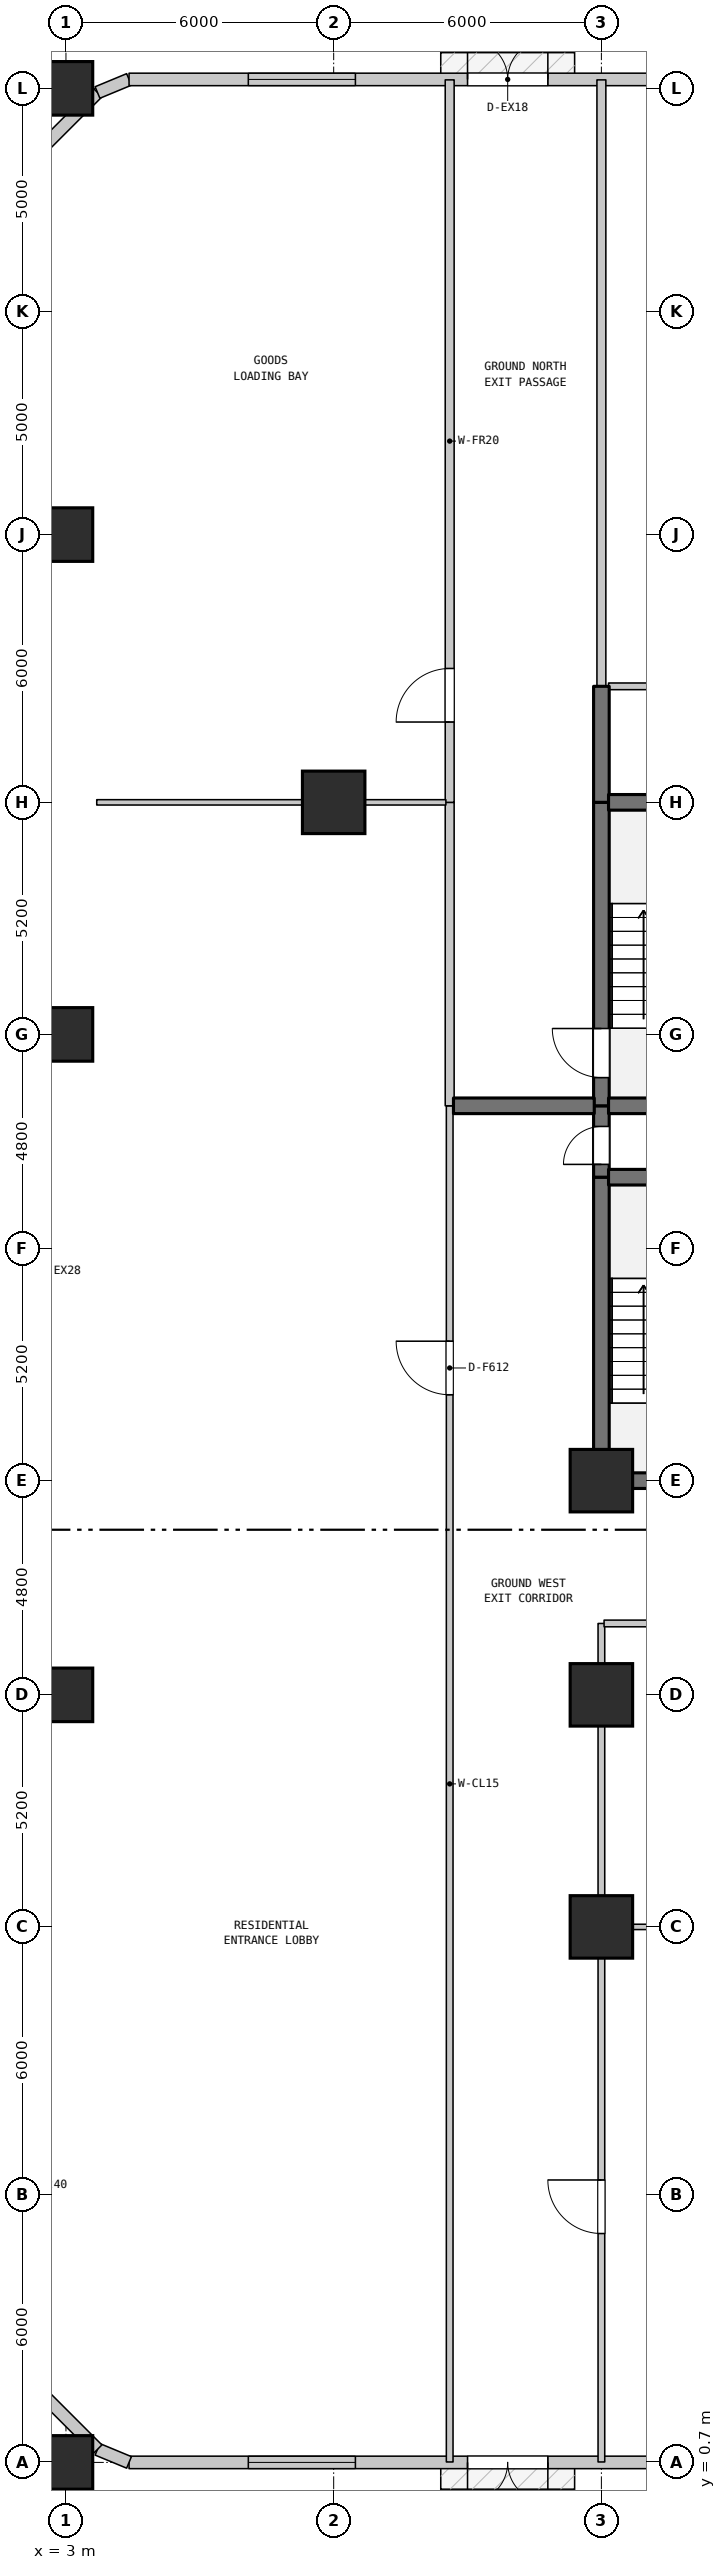
"""IFC4 building model, lengths in metres.
Left out: names, types, materials, properties, quantities, classifications, styles, units other than length and angle.
Written with IfcOpenShell. Run it as: python <this file> out.ifc"""

import sys

from ifc_helpers import new_model, si_unit, direction, frame, frame_2d, origin, origin_2d, place, context, subcontext, project, spatial, rectangle, extrude, element, fill, save


model = new_model("IFC4")
c1 = context("Model", 3, precision=1e-05, world=origin(), true_north=direction((0.0, 1.0)))
c2 = subcontext(c1, "Body", "Model", "MODEL_VIEW")
j1 = project(units=[si_unit("LENGTHUNIT", "METRE"), si_unit("PLANEANGLEUNIT", "RADIAN")], contexts=[c1])
p1 = place(None, origin())
s1 = spatial("IfcSite", under=j1, at=p1, CompositionType="ELEMENT")
p2 = place(p1, origin())
s2 = spatial("IfcBuilding", under=s1, at=p2, CompositionType="ELEMENT")
p3 = place(p2, origin())
s3 = spatial("IfcBuildingStorey", under=s2, at=p3, CompositionType="ELEMENT", Elevation=0.0)
for number, where, z_axis, x_axis in (
    (1, (3.0, 0.7, 0.0), (0.0, 0.0, 1.0), (1.0, 0.0, 0.0)),
    (2, (3.0, 17.9, 0.0), (0.0, 0.0, 1.0), (1.0, 0.0, 0.0)),
    (3, (3.0, 32.7, 0.0), (0.0, 0.0, 1.0), (1.0, 0.0, 0.0)),
    (4, (3.0, 43.9, 0.0), (0.0, 0.0, 1.0), (1.0, 0.0, 0.0)),
    (5, (3.0, 53.9, 0.0), (0.0, 0.0, 1.0), (1.0, 0.0, 0.0)),
):
    element("IfcColumn", number, at=place(p3, frame(where, z_axis=z_axis, x_axis=x_axis)), inside=s3, PredefinedType="PILASTER", context=c2, shape_type="SweptSolid", body=[
        extrude(rectangle(XDim=1.2, YDim=1.2, at=origin_2d()), origin(), (0.0, 0.0, 1.0), 6.5),
    ])
for number, where, z_axis, x_axis in (
    (6, (9.0, 37.9, 0.0), (0.0, 0.0, 1.0), (1.0, 0.0, 0.0)),
    (7, (15.0, 12.7, 0.0), (0.0, 0.0, 1.0), (1.0, 0.0, 0.0)),
    (8, (15.0, 17.9, 0.0), (0.0, 0.0, 1.0), (1.0, 0.0, 0.0)),
    (9, (15.0, 22.7, 0.0), (0.0, 0.0, 1.0), (1.0, 0.0, 0.0)),
):
    element("IfcColumn", number, at=place(p3, frame(where, z_axis=z_axis, x_axis=x_axis)), inside=s3, PredefinedType="COLUMN", context=c2, shape_type="SweptSolid", body=[
        extrude(rectangle(XDim=1.4, YDim=1.4, at=origin_2d()), origin(), (0.0, 0.0, 1.0), 6.5),
    ])
p4 = place(p3, frame((2.293, 52.393, 0.0), z_axis=(0.0, 0.0, 1.0), x_axis=(0.707167825498, 0.707045731605, 0.0)))
e10 = element("IfcWall", 10, at=p4, inside=s3, PredefinedType="STANDARD", context=c2, shape_type="SweptSolid", body=[
    extrude(rectangle(XDim=2.0, YDim=0.28, at=frame_2d((1.0, 0.0))), origin(), (0.0, 0.0, 1.0), 6.17),
])
p5 = place(p3, frame((3.707, 53.807, 0.0), z_axis=(0.0, 0.0, 1.0), x_axis=(0.923717339373, 0.383074766777, 0.0)))
e11 = element("IfcWall", 11, at=p5, inside=s3, PredefinedType="STANDARD", context=c2, shape_type="SweptSolid", body=[
    extrude(rectangle(XDim=0.765, YDim=0.28, at=frame_2d((0.383, 0.0))), origin(), (0.0, 0.0, 1.0), 6.17),
])
p6 = place(p3, frame((4.414, 54.1, 0.0), z_axis=(0.0, 0.0, 1.0), x_axis=(1.0, 0.0, 0.0)))
e12 = element("IfcWall", 12, at=p6, inside=s3, PredefinedType="STANDARD", context=c2, shape_type="SweptSolid", body=[
    extrude(rectangle(XDim=28.586, YDim=0.28, at=frame_2d((14.293, 0.0))), origin(), (0.0, 0.0, 1.0), 6.17),
])
p7 = place(p6, frame((7.586, 0.0, 0.0)))
e13 = element("IfcOpeningElement", 13, at=p7, cuts=e12, PredefinedType="OPENING", context=c2, shape_type="SweptSolid", body=[
    extrude(rectangle(XDim=1.8, YDim=2.4, at=frame_2d((0.9, 1.2))), frame((0.0, 0.15, 0.0), z_axis=(0.0, -1.0, 0.0), x_axis=(1.0, 0.0, 0.0)), (0.0, 0.0, 1.0), 0.3),
])
p8 = place(p6, frame((2.673, 0.0, 0.9)))
e14 = element("IfcOpeningElement", 14, at=p8, cuts=e12, PredefinedType="OPENING", context=c2, shape_type="SweptSolid", body=[
    extrude(rectangle(XDim=2.4, YDim=2.4, at=frame_2d((1.2, 1.2))), frame((0.0, 0.15, 0.0), z_axis=(0.0, -1.0, 0.0), x_axis=(1.0, 0.0, 0.0)), (0.0, 0.0, 1.0), 0.3),
])
p9 = place(p6, frame((17.816, 0.0, 0.9)))
e15 = element("IfcOpeningElement", 15, at=p9, cuts=e12, PredefinedType="OPENING", context=c2, shape_type="SweptSolid", body=[
    extrude(rectangle(XDim=2.4, YDim=2.4, at=frame_2d((1.2, 1.2))), frame((0.0, 0.15, 0.0), z_axis=(0.0, -1.0, 0.0), x_axis=(1.0, 0.0, 0.0)), (0.0, 0.0, 1.0), 0.3),
])
p10 = place(p6, frame((23.963, 0.0, 0.9)))
e16 = element("IfcOpeningElement", 16, at=p10, cuts=e12, PredefinedType="OPENING", context=c2, shape_type="SweptSolid", body=[
    extrude(rectangle(XDim=2.4, YDim=2.4, at=frame_2d((1.2, 1.2))), frame((0.0, 0.15, 0.0), z_axis=(0.0, -1.0, 0.0), x_axis=(1.0, 0.0, 0.0)), (0.0, 0.0, 1.0), 0.3),
])
p11 = place(p3, frame((33.0, 0.7, 0.0), z_axis=(0.0, 0.0, 1.0), x_axis=(-1.0, 0.0, 0.0)))
e17 = element("IfcWall", 17, at=p11, inside=s3, PredefinedType="STANDARD", context=c2, shape_type="SweptSolid", body=[
    extrude(rectangle(XDim=28.586, YDim=0.28, at=frame_2d((14.293, 0.0))), origin(), (0.0, 0.0, 1.0), 6.17),
])
p12 = place(p11, frame((19.2, 0.0, 0.0)))
e18 = element("IfcOpeningElement", 18, at=p12, cuts=e17, PredefinedType="OPENING", context=c2, shape_type="SweptSolid", body=[
    extrude(rectangle(XDim=1.8, YDim=2.4, at=frame_2d((0.9, 1.2))), frame((0.0, 0.15, 0.0), z_axis=(0.0, -1.0, 0.0), x_axis=(1.0, 0.0, 0.0)), (0.0, 0.0, 1.0), 0.3),
])
p13 = place(p11, frame((14.293, 0.0, 0.0)))
e19 = element("IfcOpeningElement", 19, at=p13, cuts=e17, PredefinedType="OPENING", context=c2, shape_type="SweptSolid", body=[
    extrude(rectangle(XDim=2.4, YDim=2.45, at=frame_2d((1.2, 1.225))), frame((0.0, 0.15, 0.0), z_axis=(0.0, -1.0, 0.0), x_axis=(1.0, 0.0, 0.0)), (0.0, 0.0, 1.0), 0.3),
])
p14 = place(p11, frame((2.223, 0.0, 0.9)))
e20 = element("IfcOpeningElement", 20, at=p14, cuts=e17, PredefinedType="OPENING", context=c2, shape_type="SweptSolid", body=[
    extrude(rectangle(XDim=2.4, YDim=2.4, at=frame_2d((1.2, 1.2))), frame((0.0, 0.15, 0.0), z_axis=(0.0, -1.0, 0.0), x_axis=(1.0, 0.0, 0.0)), (0.0, 0.0, 1.0), 0.3),
])
p15 = place(p11, frame((8.37, 0.0, 0.9)))
e21 = element("IfcOpeningElement", 21, at=p15, cuts=e17, PredefinedType="OPENING", context=c2, shape_type="SweptSolid", body=[
    extrude(rectangle(XDim=2.4, YDim=2.4, at=frame_2d((1.2, 1.2))), frame((0.0, 0.15, 0.0), z_axis=(0.0, -1.0, 0.0), x_axis=(1.0, 0.0, 0.0)), (0.0, 0.0, 1.0), 0.3),
])
p16 = place(p11, frame((23.513, 0.0, 0.9)))
e22 = element("IfcOpeningElement", 22, at=p16, cuts=e17, PredefinedType="OPENING", context=c2, shape_type="SweptSolid", body=[
    extrude(rectangle(XDim=2.4, YDim=2.4, at=frame_2d((1.2, 1.2))), frame((0.0, 0.15, 0.0), z_axis=(0.0, -1.0, 0.0), x_axis=(1.0, 0.0, 0.0)), (0.0, 0.0, 1.0), 0.3),
])
p17 = place(p3, frame((4.414, 0.7, 0.0), z_axis=(0.0, 0.0, 1.0), x_axis=(-0.92383017907, 0.382802560388, 0.0)))
e23 = element("IfcWall", 23, at=p17, inside=s3, PredefinedType="STANDARD", context=c2, shape_type="SweptSolid", body=[
    extrude(rectangle(XDim=0.765, YDim=0.28, at=frame_2d((0.383, 0.0))), origin(), (0.0, 0.0, 1.0), 6.17),
])
p18 = place(p3, frame((3.707, 0.993, 0.0), z_axis=(0.0, 0.0, 1.0), x_axis=(-0.707106781187, 0.707106781187, 0.0)))
e24 = element("IfcWall", 24, at=p18, inside=s3, PredefinedType="STANDARD", context=c2, shape_type="SweptSolid", body=[
    extrude(rectangle(XDim=2.0, YDim=0.28, at=frame_2d((1.0, 0.0))), origin(), (0.0, 0.0, 1.0), 6.17),
])
p19 = place(p3, frame((11.6, 0.71, 0.0), z_axis=(0.0, 0.0, 1.0), x_axis=(0.0, 1.0, 0.0)))
e25 = element("IfcWall", 25, at=p19, inside=s3, PredefinedType="STANDARD", context=c2, shape_type="SweptSolid", body=[
    extrude(rectangle(XDim=30.39, YDim=0.15, at=frame_2d((15.195, 0.0))), origin(), (0.0, 0.0, 1.0), 6.17),
])
p20 = place(p19, frame((23.915, 0.0, 0.0)))
e26 = element("IfcOpeningElement", 26, at=p20, cuts=e25, PredefinedType="OPENING", context=c2, shape_type="SweptSolid", body=[
    extrude(rectangle(XDim=1.2, YDim=2.2, at=frame_2d((0.6, 1.1))), frame((0.0, 0.085, 0.0), z_axis=(0.0, -1.0, 0.0), x_axis=(1.0, 0.0, 0.0)), (0.0, 0.0, 1.0), 0.17),
])
p21 = place(p3, frame((11.6, 31.1, 0.0), z_axis=(0.0, 0.0, 1.0), x_axis=(0.0, 1.0, 0.0)))
e27 = element("IfcWall", 27, at=p21, inside=s3, PredefinedType="STANDARD", context=c2, shape_type="SweptSolid", body=[
    extrude(rectangle(XDim=6.8, YDim=0.2, at=frame_2d((3.4, 0.0))), origin(), (0.0, 0.0, 1.0), 6.17),
])
p22 = place(p3, frame((11.6, 37.9, 0.0), z_axis=(0.0, 0.0, 1.0), x_axis=(0.0, 1.0, 0.0)))
e28 = element("IfcWall", 28, at=p22, inside=s3, PredefinedType="STANDARD", context=c2, shape_type="SweptSolid", body=[
    extrude(rectangle(XDim=16.19, YDim=0.2, at=frame_2d((8.095, 0.0))), origin(), (0.0, 0.0, 1.0), 6.17),
])
p23 = place(p22, frame((1.8, 0.0, 0.0)))
e29 = element("IfcOpeningElement", 29, at=p23, cuts=e28, PredefinedType="OPENING", context=c2, shape_type="SweptSolid", body=[
    extrude(rectangle(XDim=1.2, YDim=2.2, at=frame_2d((0.6, 1.1))), frame((0.0, 0.11, 0.0), z_axis=(0.0, -1.0, 0.0), x_axis=(1.0, 0.0, 0.0)), (0.0, 0.0, 1.0), 0.22),
])
p24 = place(p3, frame((15.0, 0.71, 0.0), z_axis=(0.0, 0.0, 1.0), x_axis=(0.0, 1.0, 0.0)))
e30 = element("IfcWall", 30, at=p24, inside=s3, PredefinedType="STANDARD", context=c2, shape_type="SweptSolid", body=[
    extrude(rectangle(XDim=11.99, YDim=0.15, at=frame_2d((5.995, 0.0))), origin(), (0.0, 0.0, 1.0), 6.17),
])
p25 = place(p24, frame((5.119, 0.0, 0.0)))
e31 = element("IfcOpeningElement", 31, at=p25, cuts=e30, PredefinedType="OPENING", context=c2, shape_type="SweptSolid", body=[
    extrude(rectangle(XDim=1.2, YDim=2.2, at=frame_2d((0.6, 1.1))), frame((0.0, 0.085, 0.0), z_axis=(0.0, -1.0, 0.0), x_axis=(1.0, 0.0, 0.0)), (0.0, 0.0, 1.0), 0.17),
])
p26 = place(p3, frame((15.0, 12.7, 0.0), z_axis=(0.0, 0.0, 1.0), x_axis=(0.0, 1.0, 0.0)))
e32 = element("IfcWall", 32, at=p26, inside=s3, PredefinedType="STANDARD", context=c2, shape_type="SweptSolid", body=[
    extrude(rectangle(XDim=6.8, YDim=0.15, at=frame_2d((3.4, 0.0))), origin(), (0.0, 0.0, 1.0), 5.67),
])
p27 = place(p3, frame((15.0, 22.7, 0.0), z_axis=(0.0, 0.0, 1.0), x_axis=(0.0, 1.0, 0.0)))
e33 = element("IfcWall", 33, at=p27, inside=s3, PredefinedType="SHEAR", context=c2, shape_type="SweptSolid", body=[
    extrude(rectangle(XDim=6.8, YDim=0.35, at=frame_2d((3.4, 0.0))), origin(), (0.0, 0.0, 1.0), 6.17),
])
p28 = place(p3, frame((15.0, 29.5, 0.0), z_axis=(0.0, 0.0, 1.0), x_axis=(0.0, 1.0, 0.0)))
e34 = element("IfcWall", 34, at=p28, inside=s3, PredefinedType="SHEAR", context=c2, shape_type="SweptSolid", body=[
    extrude(rectangle(XDim=1.6, YDim=0.35, at=frame_2d((0.8, 0.0))), origin(), (0.0, 0.0, 1.0), 6.17),
])
p29 = place(p28, frame((0.287, 0.0, 0.0)))
e35 = element("IfcOpeningElement", 35, at=p29, cuts=e34, PredefinedType="OPENING", context=c2, shape_type="SweptSolid", body=[
    extrude(rectangle(XDim=0.85, YDim=2.1, at=frame_2d((0.425, 1.05))), frame((0.0, 0.185, 0.0), z_axis=(0.0, -1.0, 0.0), x_axis=(1.0, 0.0, 0.0)), (0.0, 0.0, 1.0), 0.37),
])
p30 = place(p3, frame((15.0, 31.1, 0.0), z_axis=(0.0, 0.0, 1.0), x_axis=(0.0, 1.0, 0.0)))
e36 = element("IfcWall", 36, at=p30, inside=s3, PredefinedType="SHEAR", context=c2, shape_type="SweptSolid", body=[
    extrude(rectangle(XDim=6.8, YDim=0.35, at=frame_2d((3.4, 0.0))), origin(), (0.0, 0.0, 1.0), 6.17),
])
p31 = place(p30, frame((0.632, 0.0, 0.0)))
e37 = element("IfcOpeningElement", 37, at=p31, cuts=e36, PredefinedType="OPENING", context=c2, shape_type="SweptSolid", body=[
    extrude(rectangle(XDim=1.1, YDim=2.15, at=frame_2d((0.55, 1.075))), frame((0.0, 0.185, 0.0), z_axis=(0.0, -1.0, 0.0), x_axis=(1.0, 0.0, 0.0)), (0.0, 0.0, 1.0), 0.37),
])
p32 = place(p3, frame((15.0, 37.9, 0.0), z_axis=(0.0, 0.0, 1.0), x_axis=(0.0, 1.0, 0.0)))
e38 = element("IfcWall", 38, at=p32, inside=s3, PredefinedType="SHEAR", context=c2, shape_type="SweptSolid", body=[
    extrude(rectangle(XDim=2.6, YDim=0.35, at=frame_2d((1.3, 0.0))), origin(), (0.0, 0.0, 1.0), 6.17),
])
p33 = place(p3, frame((15.0, 40.5, 0.0), z_axis=(0.0, 0.0, 1.0), x_axis=(0.0, 1.0, 0.0)))
e39 = element("IfcWall", 39, at=p33, inside=s3, PredefinedType="STANDARD", context=c2, shape_type="SweptSolid", body=[
    extrude(rectangle(XDim=13.59, YDim=0.2, at=frame_2d((6.795, 0.0))), origin(), (0.0, 0.0, 1.0), 6.17),
])
p34 = place(p3, frame((15.06, 12.7, 0.0), z_axis=(0.0, 0.0, 1.0), x_axis=(1.0, 0.0, 0.0)))
e40 = element("IfcWall", 40, at=p34, inside=s3, PredefinedType="PARTITIONING", context=c2, shape_type="SweptSolid", body=[
    extrude(rectangle(XDim=8.895, YDim=0.12, at=frame_2d((4.448, 0.0))), origin(), (0.0, 0.0, 1.0), 6.17),
])
p35 = place(p3, frame((15.06, 19.5, 0.0), z_axis=(0.0, 0.0, 1.0), x_axis=(1.0, 0.0, 0.0)))
e41 = element("IfcWall", 41, at=p35, inside=s3, PredefinedType="STANDARD", context=c2, shape_type="SweptSolid", body=[
    extrude(rectangle(XDim=8.895, YDim=0.15, at=frame_2d((4.448, 0.0))), origin(), (0.0, 0.0, 1.0), 6.17),
])
p36 = place(p35, frame((3.89, 0.0, 0.0)))
e42 = element("IfcOpeningElement", 42, at=p36, cuts=e41, PredefinedType="OPENING", context=c2, shape_type="SweptSolid", body=[
    extrude(rectangle(XDim=1.1, YDim=2.15, at=frame_2d((0.55, 1.075))), frame((0.0, 0.085, 0.0), z_axis=(0.0, -1.0, 0.0), x_axis=(1.0, 0.0, 0.0)), (0.0, 0.0, 1.0), 0.17),
])
p37 = place(p3, frame((15.16, 22.7, 0.0), z_axis=(0.0, 0.0, 1.0), x_axis=(1.0, 0.0, 0.0)))
e43 = element("IfcWall", 43, at=p37, inside=s3, PredefinedType="SHEAR", context=c2, shape_type="SweptSolid", body=[
    extrude(rectangle(XDim=3.68, YDim=0.35, at=frame_2d((1.84, 0.0))), origin(), (0.0, 0.0, 1.0), 6.17),
])
p38 = place(p37, frame((1.217, 0.0, 0.0)))
e44 = element("IfcOpeningElement", 44, at=p38, cuts=e43, PredefinedType="OPENING", context=c2, shape_type="SweptSolid", body=[
    extrude(rectangle(XDim=1.1, YDim=2.15, at=frame_2d((0.55, 1.075))), frame((0.0, 0.185, 0.0), z_axis=(0.0, -1.0, 0.0), x_axis=(1.0, 0.0, 0.0)), (0.0, 0.0, 1.0), 0.37),
])
p39 = place(p3, frame((15.16, 29.5, 0.0), z_axis=(0.0, 0.0, 1.0), x_axis=(1.0, 0.0, 0.0)))
e45 = element("IfcWall", 45, at=p39, inside=s3, PredefinedType="SHEAR", context=c2, shape_type="SweptSolid", body=[
    extrude(rectangle(XDim=3.68, YDim=0.35, at=frame_2d((1.84, 0.0))), origin(), (0.0, 0.0, 1.0), 6.17),
])
p40 = place(p3, frame((11.685, 31.1, 0.0), z_axis=(0.0, 0.0, 1.0), x_axis=(1.0, 0.0, 0.0)))
e46 = element("IfcWall", 46, at=p40, inside=s3, PredefinedType="SHEAR", context=c2, shape_type="SweptSolid", body=[
    extrude(rectangle(XDim=3.155, YDim=0.35, at=frame_2d((1.578, 0.0))), origin(), (0.0, 0.0, 1.0), 6.17),
])
p41 = place(p3, frame((15.16, 31.1, 0.0), z_axis=(0.0, 0.0, 1.0), x_axis=(1.0, 0.0, 0.0)))
e47 = element("IfcWall", 47, at=p41, inside=s3, PredefinedType="SHEAR", context=c2, shape_type="SweptSolid", body=[
    extrude(rectangle(XDim=3.68, YDim=0.35, at=frame_2d((1.84, 0.0))), origin(), (0.0, 0.0, 1.0), 6.17),
])
p42 = place(p3, frame((3.69, 37.9, 0.0), z_axis=(0.0, 0.0, 1.0), x_axis=(1.0, 0.0, 0.0)))
e48 = element("IfcWall", 48, at=p42, inside=s3, PredefinedType="PARTITIONING", context=c2, shape_type="SweptSolid", body=[
    extrude(rectangle(XDim=7.825, YDim=0.12, at=frame_2d((3.913, 0.0))), origin(), (0.0, 0.0, 1.0), 6.17),
])
p43 = place(p3, frame((15.16, 37.9, 0.0), z_axis=(0.0, 0.0, 1.0), x_axis=(1.0, 0.0, 0.0)))
e49 = element("IfcWall", 49, at=p43, inside=s3, PredefinedType="SHEAR", context=c2, shape_type="SweptSolid", body=[
    extrude(rectangle(XDim=3.68, YDim=0.35, at=frame_2d((1.84, 0.0))), origin(), (0.0, 0.0, 1.0), 6.17),
])
p44 = place(p3, frame((15.16, 40.5, 0.0), z_axis=(0.0, 0.0, 1.0), x_axis=(1.0, 0.0, 0.0)))
e50 = element("IfcWall", 50, at=p44, inside=s3, PredefinedType="STANDARD", context=c2, shape_type="SweptSolid", body=[
    extrude(rectangle(XDim=17.83, YDim=0.15, at=frame_2d((8.915, 0.0))), origin(), (0.0, 0.0, 1.0), 6.17),
])
p45 = place(p44, frame((5.24, 0.0, 0.0)))
e51 = element("IfcOpeningElement", 51, at=p45, cuts=e50, PredefinedType="OPENING", context=c2, shape_type="SweptSolid", body=[
    extrude(rectangle(XDim=1.2, YDim=2.2, at=frame_2d((0.6, 1.1))), frame((0.0, 0.085, 0.0), z_axis=(0.0, -1.0, 0.0), x_axis=(1.0, 0.0, 0.0)), (0.0, 0.0, 1.0), 0.17),
])
p46 = place(p7, origin())
e52 = element("IfcDoor", 52, at=p46, inside=s3, OperationType="DOUBLE_DOOR_SINGLE_SWING", PredefinedType="DOOR", context=c2, shape_type="SweptSolid", body=[
    extrude(rectangle(XDim=1.8, YDim=2.4, at=frame_2d((0.9, 1.2))), frame((0.0, 0.025, 0.0), z_axis=(0.0, -1.0, 0.0), x_axis=(1.0, 0.0, 0.0)), (0.0, 0.0, 1.0), 0.05),
])
fill(e13, e52)
p47 = place(p8, origin())
e53 = element("IfcWindow", 53, at=p47, inside=s3, PartitioningType="DOUBLE_PANEL_VERTICAL", PredefinedType="WINDOW", context=c2, shape_type="SweptSolid", body=[
    extrude(rectangle(XDim=2.4, YDim=2.4, at=frame_2d((1.2, 1.2))), frame((0.0, 0.03, 0.0), z_axis=(0.0, -1.0, 0.0), x_axis=(1.0, 0.0, 0.0)), (0.0, 0.0, 1.0), 0.06),
])
fill(e14, e53)
p48 = place(p12, origin())
e54 = element("IfcDoor", 54, at=p48, inside=s3, OperationType="DOUBLE_DOOR_SINGLE_SWING", PredefinedType="DOOR", context=c2, shape_type="SweptSolid", body=[
    extrude(rectangle(XDim=1.8, YDim=2.4, at=frame_2d((0.9, 1.2))), frame((0.0, 0.025, 0.0), z_axis=(0.0, -1.0, 0.0), x_axis=(1.0, 0.0, 0.0)), (0.0, 0.0, 1.0), 0.05),
])
fill(e18, e54)
p49 = place(p16, origin())
e55 = element("IfcWindow", 55, at=p49, inside=s3, PartitioningType="DOUBLE_PANEL_VERTICAL", PredefinedType="WINDOW", context=c2, shape_type="SweptSolid", body=[
    extrude(rectangle(XDim=2.4, YDim=2.4, at=frame_2d((1.2, 1.2))), frame((0.0, 0.03, 0.0), z_axis=(0.0, -1.0, 0.0), x_axis=(1.0, 0.0, 0.0)), (0.0, 0.0, 1.0), 0.06),
])
fill(e22, e55)
p50 = place(p20, origin())
e56 = element("IfcDoor", 56, at=p50, inside=s3, OperationType="SINGLE_SWING_RIGHT", PredefinedType="DOOR", context=c2, shape_type="SweptSolid", body=[
    extrude(rectangle(XDim=1.2, YDim=2.2, at=frame_2d((0.6, 1.1))), frame((0.0, 0.025, 0.0), z_axis=(0.0, -1.0, 0.0), x_axis=(1.0, 0.0, 0.0)), (0.0, 0.0, 1.0), 0.05),
])
fill(e26, e56)
p51 = place(p23, origin())
e57 = element("IfcDoor", 57, at=p51, inside=s3, OperationType="SINGLE_SWING_LEFT", PredefinedType="DOOR", context=c2, shape_type="SweptSolid", body=[
    extrude(rectangle(XDim=1.2, YDim=2.2, at=frame_2d((0.6, 1.1))), frame((0.0, 0.025, 0.0), z_axis=(0.0, -1.0, 0.0), x_axis=(1.0, 0.0, 0.0)), (0.0, 0.0, 1.0), 0.05),
])
fill(e29, e57)
p52 = place(p25, origin())
e58 = element("IfcDoor", 58, at=p52, inside=s3, OperationType="SINGLE_SWING_RIGHT", PredefinedType="DOOR", context=c2, shape_type="SweptSolid", body=[
    extrude(rectangle(XDim=1.2, YDim=2.2, at=frame_2d((0.6, 1.1))), frame((0.0, 0.025, 0.0), z_axis=(0.0, -1.0, 0.0), x_axis=(1.0, 0.0, 0.0)), (0.0, 0.0, 1.0), 0.05),
])
fill(e31, e58)
p53 = place(p29, origin())
e59 = element("IfcDoor", 59, at=p53, inside=s3, OperationType="SINGLE_SWING_LEFT", PredefinedType="DOOR", context=c2, shape_type="SweptSolid", body=[
    extrude(rectangle(XDim=0.85, YDim=2.1, at=frame_2d((0.425, 1.05))), frame((0.0, 0.025, 0.0), z_axis=(0.0, -1.0, 0.0), x_axis=(1.0, 0.0, 0.0)), (0.0, 0.0, 1.0), 0.05),
])
fill(e35, e59)
p54 = place(p31, origin())
e60 = element("IfcDoor", 60, at=p54, inside=s3, OperationType="SINGLE_SWING_RIGHT", PredefinedType="DOOR", context=c2, shape_type="SweptSolid", body=[
    extrude(rectangle(XDim=1.1, YDim=2.15, at=frame_2d((0.55, 1.075))), frame((0.0, 0.025, 0.0), z_axis=(0.0, -1.0, 0.0), x_axis=(1.0, 0.0, 0.0)), (0.0, 0.0, 1.0), 0.05),
])
fill(e37, e60)
save(model, sys.argv[1])
